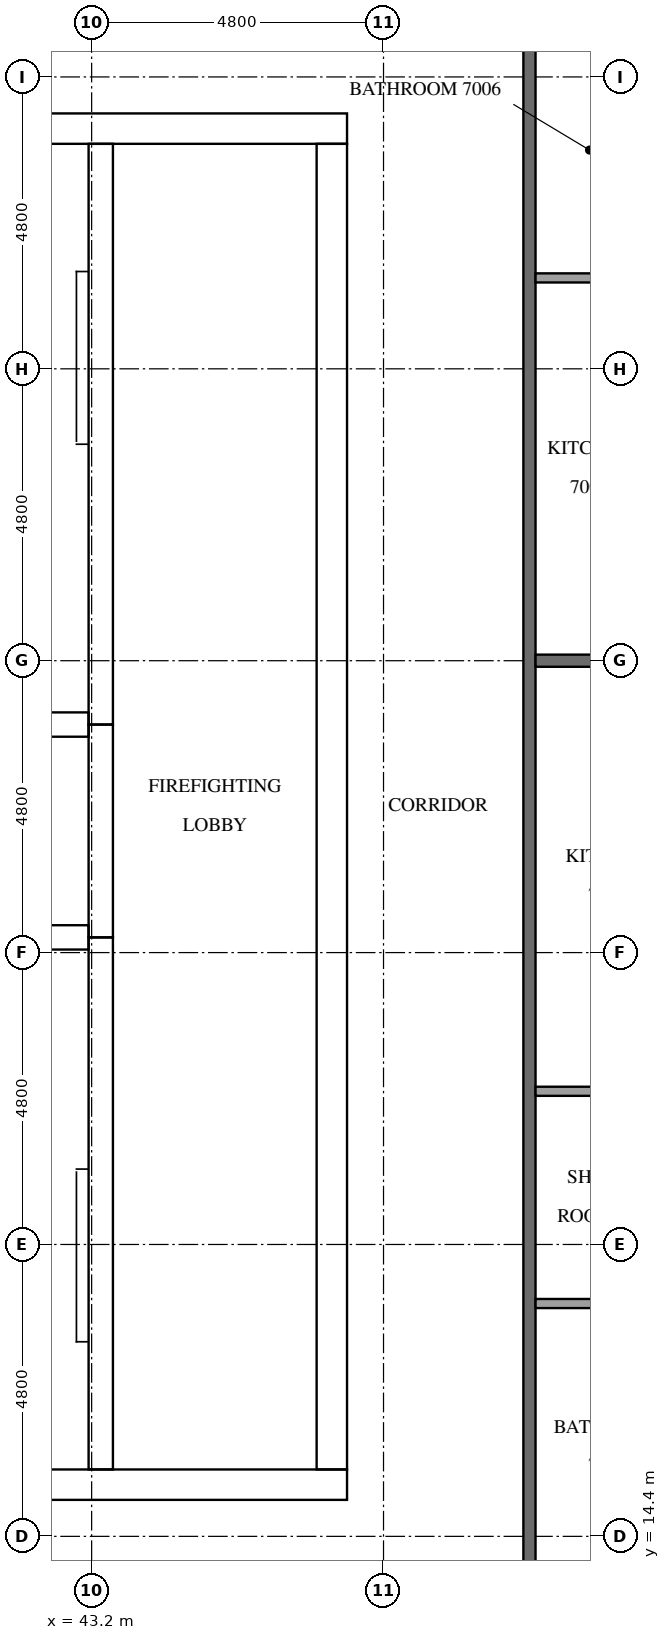
"""IFC4 building model, lengths in metres.
Left out: names, types, materials, properties, quantities, classifications, styles, units other than length and angle.
Written with IfcOpenShell. Run it as: python <this file> out.ifc"""

import sys

from ifc_helpers import new_model, si_unit, direction, frame, frame_2d, origin, place, context, subcontext, project, spatial, rectangle, extrude, element, fill, save


model = new_model("IFC4")
c1 = context("Model", 3, precision=1e-05, world=origin(), true_north=direction((0.0, 1.0)))
c2 = subcontext(c1, "Body", "Model", "MODEL_VIEW")
j1 = project(units=[si_unit("LENGTHUNIT", "METRE"), si_unit("PLANEANGLEUNIT", "RADIAN")], contexts=[c1])
p1 = place(None, origin())
s1 = spatial("IfcSite", under=j1, at=p1, CompositionType="ELEMENT")
p2 = place(p1, origin())
s2 = spatial("IfcBuilding", under=s1, at=p2, CompositionType="ELEMENT")
p3 = place(p2, frame((0.0, 0.0, 268.6)))
s3 = spatial("IfcBuildingStorey", under=s2, at=p3, CompositionType="ELEMENT", Elevation=268.6)
p4 = place(p3, frame((15.0, 15.25, 0.0), z_axis=(0.0, 0.0, 1.0), x_axis=(1.0, 0.0, 0.0)))
e1 = element("IfcWall", 1, at=p4, inside=s3, PredefinedType="SHEAR", context=c2, shape_type="SweptSolid", body=[
    extrude(rectangle(XDim=32.4, YDim=0.5, at=frame_2d((16.2, 0.0))), origin(), (0.0, 0.0, 1.0), 3.2),
])
p5 = place(p4, frame((15.3, 0.0, 0.0)))
e2 = element("IfcOpeningElement", 2, at=p5, cuts=e1, PredefinedType="OPENING", context=c2, shape_type="SweptSolid", body=[
    extrude(rectangle(XDim=1.8, YDim=2.1, at=frame_2d((0.9, 1.05))), frame((0.0, 0.26, 0.0), z_axis=(0.0, -1.0, 0.0), x_axis=(1.0, 0.0, 0.0)), (0.0, 0.0, 1.0), 0.52),
])
p6 = place(p3, frame((15.0, 37.55, 0.0), z_axis=(0.0, 0.0, 1.0), x_axis=(1.0, 0.0, 0.0)))
e3 = element("IfcWall", 3, at=p6, inside=s3, PredefinedType="SHEAR", context=c2, shape_type="SweptSolid", body=[
    extrude(rectangle(XDim=32.4, YDim=0.5, at=frame_2d((16.2, 0.0))), origin(), (0.0, 0.0, 1.0), 3.2),
])
p7 = place(p6, frame((15.3, 0.0, 0.0)))
e4 = element("IfcOpeningElement", 4, at=p7, cuts=e3, PredefinedType="OPENING", context=c2, shape_type="SweptSolid", body=[
    extrude(rectangle(XDim=1.8, YDim=2.1, at=frame_2d((0.9, 1.05))), frame((0.0, 0.26, 0.0), z_axis=(0.0, -1.0, 0.0), x_axis=(1.0, 0.0, 0.0)), (0.0, 0.0, 1.0), 0.52),
])
p8 = place(p6, frame((1.282, 0.0, 0.0)))
e5 = element("IfcOpeningElement", 5, at=p8, cuts=e3, PredefinedType="OPENING", context=c2, shape_type="SweptSolid", body=[
    extrude(rectangle(XDim=1.0, YDim=2.1, at=frame_2d((0.5, 1.05))), frame((0.0, 0.26, 0.0), z_axis=(0.0, -1.0, 0.0), x_axis=(1.0, 0.0, 0.0)), (0.0, 0.0, 1.0), 0.52),
])
p9 = place(p6, frame((5.082, 0.0, 0.0)))
e6 = element("IfcOpeningElement", 6, at=p9, cuts=e3, PredefinedType="OPENING", context=c2, shape_type="SweptSolid", body=[
    extrude(rectangle(XDim=1.0, YDim=2.1, at=frame_2d((0.5, 1.05))), frame((0.0, 0.26, 0.0), z_axis=(0.0, -1.0, 0.0), x_axis=(1.0, 0.0, 0.0)), (0.0, 0.0, 1.0), 0.52),
])
p10 = place(p3, frame((47.15, 15.5, 0.0), z_axis=(0.0, 0.0, 1.0), x_axis=(0.0, 1.0, 0.0)))
e7 = element("IfcWall", 7, at=p10, inside=s3, PredefinedType="SHEAR", context=c2, shape_type="SweptSolid", body=[
    extrude(rectangle(XDim=21.8, YDim=0.5, at=frame_2d((10.9, 0.0))), origin(), (0.0, 0.0, 1.0), 3.2),
])
p11 = place(p10, frame((10.6, 0.0, 0.0)))
e8 = element("IfcOpeningElement", 8, at=p11, cuts=e7, PredefinedType="OPENING", context=c2, shape_type="SweptSolid", body=[
    extrude(rectangle(XDim=1.2, YDim=2.1, at=frame_2d((0.6, 1.05))), frame((0.0, 0.26, 0.0), z_axis=(0.0, -1.0, 0.0), x_axis=(1.0, 0.0, 0.0)), (0.0, 0.0, 1.0), 0.52),
])
p12 = place(p3, frame((43.35, 15.5, 0.0), z_axis=(0.0, 0.0, 1.0), x_axis=(0.0, 1.0, 0.0)))
e9 = element("IfcWall", 9, at=p12, inside=s3, PredefinedType="SHEAR", context=c2, shape_type="SweptSolid", body=[
    extrude(rectangle(XDim=8.75, YDim=0.4, at=frame_2d((4.375, 0.0))), origin(), (0.0, 0.0, 1.0), 3.2),
])
p13 = place(p12, frame((0.7, 0.0, 0.0)))
e10 = element("IfcOpeningElement", 10, at=p13, cuts=e9, PredefinedType="OPENING", context=c2, shape_type="SweptSolid", body=[
    extrude(rectangle(XDim=1.2, YDim=2.1, at=frame_2d((0.6, 1.05))), frame((0.0, 0.21, 0.0), z_axis=(0.0, -1.0, 0.0), x_axis=(1.0, 0.0, 0.0)), (0.0, 0.0, 1.0), 0.42),
])
p14 = place(p3, frame((43.35, 24.25, 0.0), z_axis=(0.0, 0.0, 1.0), x_axis=(0.0, 1.0, 0.0)))
e11 = element("IfcWall", 11, at=p14, inside=s3, PredefinedType="SHEAR", context=c2, shape_type="SweptSolid", body=[
    extrude(rectangle(XDim=3.5, YDim=0.4, at=frame_2d((1.75, 0.0))), origin(), (0.0, 0.0, 1.0), 3.2),
])
p15 = place(p14, frame((1.2, 0.0, 0.0)))
e12 = element("IfcOpeningElement", 12, at=p15, cuts=e11, PredefinedType="OPENING", context=c2, shape_type="SweptSolid", body=[
    extrude(rectangle(XDim=1.1, YDim=2.1, at=frame_2d((0.55, 1.05))), frame((0.0, 0.21, 0.0), z_axis=(0.0, -1.0, 0.0), x_axis=(1.0, 0.0, 0.0)), (0.0, 0.0, 1.0), 0.42),
])
p16 = place(p3, frame((43.35, 27.75, 0.0), z_axis=(0.0, 0.0, 1.0), x_axis=(0.0, 1.0, 0.0)))
e13 = element("IfcWall", 13, at=p16, inside=s3, PredefinedType="SHEAR", context=c2, shape_type="SweptSolid", body=[
    extrude(rectangle(XDim=9.55, YDim=0.4, at=frame_2d((4.775, 0.0))), origin(), (0.0, 0.0, 1.0), 3.2),
])
p17 = place(p16, frame((7.65, 0.0, 0.0)))
e14 = element("IfcOpeningElement", 14, at=p17, cuts=e13, PredefinedType="OPENING", context=c2, shape_type="SweptSolid", body=[
    extrude(rectangle(XDim=1.2, YDim=2.1, at=frame_2d((0.6, 1.05))), frame((0.0, 0.21, 0.0), z_axis=(0.0, -1.0, 0.0), x_axis=(1.0, 0.0, 0.0)), (0.0, 0.0, 1.0), 0.42),
])
for number, where, z_axis, x_axis in (
    (15, (39.5, 24.25, 0.0), (0.0, 0.0, 1.0), (1.0, 0.0, 0.0)),
    (16, (39.5, 27.75, 0.0), (0.0, 0.0, 1.0), (1.0, 0.0, 0.0)),
):
    element("IfcWall", number, at=place(p3, frame(where, z_axis=z_axis, x_axis=x_axis)), inside=s3, PredefinedType="SHEAR", context=c2, shape_type="SweptSolid", body=[
        extrude(rectangle(XDim=3.65, YDim=0.4, at=frame_2d((1.825, 0.0))), origin(), (0.0, 0.0, 1.0), 3.2),
    ])
p18 = place(p3, frame((50.4, 40.7, 0.0), z_axis=(0.0, 0.0, 1.0), x_axis=(0.0, -1.0, 0.0)))
e17 = element("IfcWall", 17, at=p18, inside=s3, PredefinedType="PARTITIONING", context=c2, shape_type="SweptSolid", body=[
    extrude(rectangle(XDim=28.6, YDim=0.2, at=frame_2d((14.3, 0.0))), origin(), (0.0, 0.0, 1.0), 3.2),
])
p19 = place(p18, frame((27.425, 0.0, 0.0)))
e18 = element("IfcOpeningElement", 18, at=p19, cuts=e17, PredefinedType="OPENING", context=c2, shape_type="SweptSolid", body=[
    extrude(rectangle(XDim=1.0, YDim=2.1, at=frame_2d((0.5, 1.05))), frame((0.0, 0.11, 0.0), z_axis=(0.0, -1.0, 0.0), x_axis=(1.0, 0.0, 0.0)), (0.0, 0.0, 1.0), 0.22),
])
p20 = place(p18, frame((0.175, 0.0, 0.0)))
e19 = element("IfcOpeningElement", 19, at=p20, cuts=e17, PredefinedType="OPENING", context=c2, shape_type="SweptSolid", body=[
    extrude(rectangle(XDim=1.0, YDim=2.1, at=frame_2d((0.5, 1.05))), frame((0.0, 0.11, 0.0), z_axis=(0.0, -1.0, 0.0), x_axis=(1.0, 0.0, 0.0)), (0.0, 0.0, 1.0), 0.22),
])
p21 = place(p3, frame((50.5, 28.8, 0.0), z_axis=(0.0, 0.0, 1.0), x_axis=(1.0, 0.0, 0.0)))
e20 = element("IfcWall", 20, at=p21, inside=s3, PredefinedType="PARTITIONING", context=c2, shape_type="SweptSolid", body=[
    extrude(rectangle(XDim=7.0, YDim=0.2, at=frame_2d((3.5, 0.0))), origin(), (0.0, 0.0, 1.0), 3.2),
])
for number, where, z_axis, x_axis in (
    (21, (50.5, 18.229, 0.0), (0.0, 0.0, 1.0), (1.0, 0.0, 0.0)),
    (22, (50.5, 21.719, 0.0), (0.0, 0.0, 1.0), (1.0, 0.0, 0.0)),
):
    element("IfcWall", number, at=place(p3, frame(where, z_axis=z_axis, x_axis=x_axis)), inside=s3, PredefinedType="PARTITIONING", context=c2, shape_type="SweptSolid", body=[
        extrude(rectangle(XDim=2.375, YDim=0.15, at=frame_2d((1.188, 0.0))), origin(), (0.0, 0.0, 1.0), 3.2),
    ])
p22 = place(p3, frame((50.5, 35.095, 0.0), z_axis=(0.0, 0.0, 1.0), x_axis=(1.0, 0.0, 0.0)))
e23 = element("IfcWall", 23, at=p22, inside=s3, PredefinedType="PARTITIONING", context=c2, shape_type="SweptSolid", body=[
    extrude(rectangle(XDim=1.775, YDim=0.15, at=frame_2d((0.887, 0.0))), origin(), (0.0, 0.0, 1.0), 3.2),
])
p23 = place(p15, origin())
e24 = element("IfcDoor", 24, at=p23, inside=s3, OperationType="DOUBLE_DOOR_SLIDING", PredefinedType="DOOR", context=c2, shape_type="SweptSolid", body=[
    extrude(rectangle(XDim=1.1, YDim=2.1, at=frame_2d((0.55, 1.05))), frame((0.0, 0.025, 0.0), z_axis=(0.0, -1.0, 0.0), x_axis=(1.0, 0.0, 0.0)), (0.0, 0.0, 1.0), 0.05),
])
fill(e12, e24)
p24 = place(p13, origin())
e25 = element("IfcDoor", 25, at=p24, inside=s3, OperationType="SINGLE_SWING_LEFT", PredefinedType="DOOR", context=c2, shape_type="SweptSolid", body=[
    extrude(rectangle(XDim=1.2, YDim=2.1, at=frame_2d((0.6, 1.05))), frame((0.0, 0.025, 0.0), z_axis=(0.0, -1.0, 0.0), x_axis=(1.0, 0.0, 0.0)), (0.0, 0.0, 1.0), 0.05),
])
fill(e10, e25)
p25 = place(p17, origin())
e26 = element("IfcDoor", 26, at=p25, inside=s3, OperationType="SINGLE_SWING_RIGHT", PredefinedType="DOOR", context=c2, shape_type="SweptSolid", body=[
    extrude(rectangle(XDim=1.2, YDim=2.1, at=frame_2d((0.6, 1.05))), frame((0.0, 0.025, 0.0), z_axis=(0.0, -1.0, 0.0), x_axis=(1.0, 0.0, 0.0)), (0.0, 0.0, 1.0), 0.05),
])
fill(e14, e26)
p26 = place(p11, origin())
e27 = element("IfcDoor", 27, at=p26, inside=s3, OperationType="SINGLE_SWING_RIGHT", PredefinedType="DOOR", context=c2, shape_type="SweptSolid", body=[
    extrude(rectangle(XDim=1.2, YDim=2.1, at=frame_2d((0.6, 1.05))), frame((0.0, 0.025, 0.0), z_axis=(0.0, -1.0, 0.0), x_axis=(1.0, 0.0, 0.0)), (0.0, 0.0, 1.0), 0.05),
])
fill(e8, e27)
save(model, sys.argv[1])
